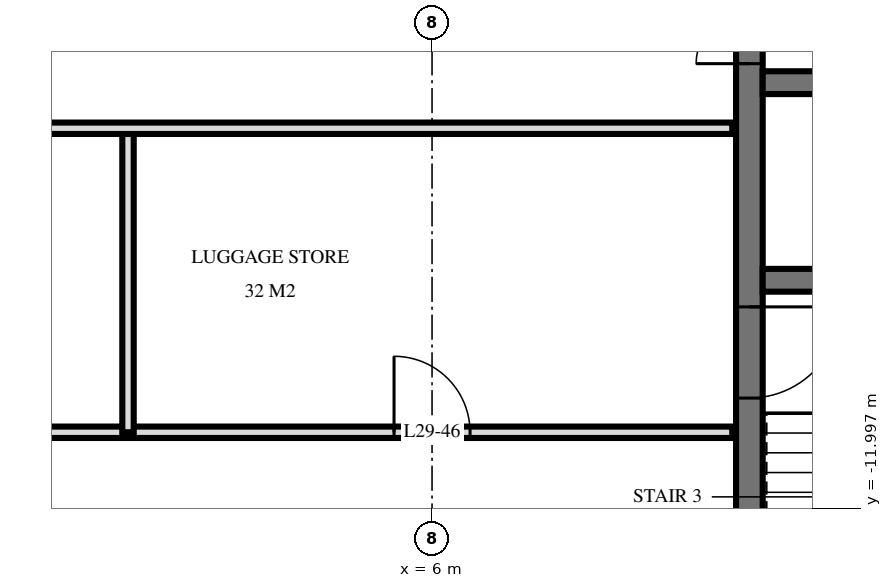
"""IFC4 building model, lengths in metres.
Left out: names, types, materials, properties, quantities, classifications, styles, units other than length and angle.
Written with IfcOpenShell. Run it as: python <this file> out.ifc"""

import sys

from ifc_helpers import new_model, si_unit, direction, frame, frame_2d, origin, place, context, subcontext, project, spatial, rectangle, extrude, element, fill, save


model = new_model("IFC4")
c1 = context("Model", 3, precision=1e-05, world=origin(), true_north=direction((0.0, 1.0)))
c2 = subcontext(c1, "Body", "Model", "MODEL_VIEW")
j1 = project(units=[si_unit("LENGTHUNIT", "METRE"), si_unit("PLANEANGLEUNIT", "RADIAN")], contexts=[c1])
p1 = place(None, origin())
s1 = spatial("IfcSite", under=j1, at=p1, CompositionType="ELEMENT")
p2 = place(p1, origin())
s2 = spatial("IfcBuilding", under=s1, at=p2, CompositionType="ELEMENT")
p3 = place(p2, frame((0.0, 0.0, 116.4)))
s3 = spatial("IfcBuildingStorey", under=s2, at=p3, CompositionType="ELEMENT", Elevation=116.4)
p4 = place(p3, frame((10.175, -14.55, 0.0), z_axis=(0.0, 0.0, 1.0), x_axis=(0.0, 1.0, 0.0)))
e1 = element("IfcWall", 1, at=p4, inside=s3, PredefinedType="SHEAR", context=c2, shape_type="SweptSolid", body=[
    extrude(rectangle(XDim=14.1, YDim=0.35, at=frame_2d((7.05, 0.0))), origin(), (0.0, 0.0, 1.0), 3.6),
])
p5 = place(p4, frame((8.4, 0.0, 0.0)))
e2 = element("IfcOpeningElement", 2, at=p5, cuts=e1, PredefinedType="OPENING", context=c2, shape_type="SweptSolid", body=[
    extrude(rectangle(XDim=1.4, YDim=2.4, at=frame_2d((0.7, 1.2))), frame((0.0, 0.185, 0.0), z_axis=(0.0, -1.0, 0.0), x_axis=(1.0, 0.0, 0.0)), (0.0, 0.0, 1.0), 0.37),
])
p6 = place(p4, frame((10.0, 0.0, 0.0)))
e3 = element("IfcOpeningElement", 3, at=p6, cuts=e1, PredefinedType="OPENING", context=c2, shape_type="SweptSolid", body=[
    extrude(rectangle(XDim=1.4, YDim=2.4, at=frame_2d((0.7, 1.2))), frame((0.0, 0.185, 0.0), z_axis=(0.0, -1.0, 0.0), x_axis=(1.0, 0.0, 0.0)), (0.0, 0.0, 1.0), 0.37),
])
p7 = place(p4, frame((4.0, 0.0, 0.0)))
e4 = element("IfcOpeningElement", 4, at=p7, cuts=e1, PredefinedType="OPENING", context=c2, shape_type="SweptSolid", body=[
    extrude(rectangle(XDim=1.2, YDim=2.1, at=frame_2d((0.6, 1.05))), frame((0.0, 0.185, 0.0), z_axis=(0.0, -1.0, 0.0), x_axis=(1.0, 0.0, 0.0)), (0.0, 0.0, 1.0), 0.37),
])
p8 = place(p3, frame((10.35, -6.4, 0.0), z_axis=(0.0, 0.0, 1.0), x_axis=(1.0, 0.0, 0.0)))
e5 = element("IfcWall", 5, at=p8, inside=s3, PredefinedType="SHEAR", context=c2, shape_type="SweptSolid", body=[
    extrude(rectangle(XDim=13.7, YDim=0.3, at=frame_2d((6.85, 0.0))), origin(), (0.0, 0.0, 1.0), 3.6),
])
p9 = place(p8, frame((12.05, 0.0, 0.0)))
e6 = element("IfcOpeningElement", 6, at=p9, cuts=e5, PredefinedType="OPENING", context=c2, shape_type="SweptSolid", body=[
    extrude(rectangle(XDim=1.1, YDim=2.1, at=frame_2d((0.55, 1.05))), frame((0.0, 0.16, 0.0), z_axis=(0.0, -1.0, 0.0), x_axis=(1.0, 0.0, 0.0)), (0.0, 0.0, 1.0), 0.32),
])
p10 = place(p8, frame((6.8, 0.0, 0.0)))
e7 = element("IfcOpeningElement", 7, at=p10, cuts=e5, PredefinedType="OPENING", context=c2, shape_type="SweptSolid", body=[
    extrude(rectangle(XDim=1.1, YDim=2.1, at=frame_2d((0.55, 1.05))), frame((0.0, 0.16, 0.0), z_axis=(0.0, -1.0, 0.0), x_axis=(1.0, 0.0, 0.0)), (0.0, 0.0, 1.0), 0.32),
])
p11 = place(p3, frame((10.35, -9.0, 0.0), z_axis=(0.0, 0.0, 1.0), x_axis=(1.0, 0.0, 0.0)))
e8 = element("IfcWall", 8, at=p11, inside=s3, PredefinedType="SHEAR", context=c2, shape_type="SweptSolid", body=[
    extrude(rectangle(XDim=13.7, YDim=0.3, at=frame_2d((6.85, 0.0))), origin(), (0.0, 0.0, 1.0), 3.6),
])
p12 = place(p11, frame((3.8, 0.0, 0.0)))
e9 = element("IfcOpeningElement", 9, at=p12, cuts=e8, PredefinedType="OPENING", context=c2, shape_type="SweptSolid", body=[
    extrude(rectangle(XDim=1.1, YDim=2.1, at=frame_2d((0.55, 1.05))), frame((0.0, 0.16, 0.0), z_axis=(0.0, -1.0, 0.0), x_axis=(1.0, 0.0, 0.0)), (0.0, 0.0, 1.0), 0.32),
])
p13 = place(p3, frame((2.0, -11.0, 0.0), z_axis=(0.0, 0.0, 1.0), x_axis=(0.0, 1.0, 0.0)))
e10 = element("IfcWall", 10, at=p13, inside=s3, PredefinedType="PARTITIONING", context=c2, shape_type="SweptSolid", body=[
    extrude(rectangle(XDim=4.0, YDim=0.15, at=frame_2d((2.0, 0.0))), origin(), (0.0, 0.0, 1.0), 3.32),
])
p14 = place(p3, frame((-9.95, -11.0, 0.0), z_axis=(0.0, 0.0, 1.0), x_axis=(1.0, 0.0, 0.0)))
e11 = element("IfcWall", 11, at=p14, inside=s3, PredefinedType="PARTITIONING", context=c2, shape_type="SweptSolid", body=[
    extrude(rectangle(XDim=19.9, YDim=0.15, at=frame_2d((9.95, 0.0))), origin(), (0.0, 0.0, 1.0), 3.32),
])
p15 = place(p14, frame((9.45, 0.0, 0.0)))
e12 = element("IfcOpeningElement", 12, at=p15, cuts=e11, PredefinedType="OPENING", context=c2, shape_type="SweptSolid", body=[
    extrude(rectangle(XDim=1.0, YDim=2.1, at=frame_2d((0.5, 1.05))), frame((0.0, 0.085, 0.0), z_axis=(0.0, -1.0, 0.0), x_axis=(1.0, 0.0, 0.0)), (0.0, 0.0, 1.0), 0.17),
])
p16 = place(p14, frame((15.45, 0.0, 0.0)))
e13 = element("IfcOpeningElement", 13, at=p16, cuts=e11, PredefinedType="OPENING", context=c2, shape_type="SweptSolid", body=[
    extrude(rectangle(XDim=1.0, YDim=2.1, at=frame_2d((0.5, 1.05))), frame((0.0, 0.085, 0.0), z_axis=(0.0, -1.0, 0.0), x_axis=(1.0, 0.0, 0.0)), (0.0, 0.0, 1.0), 0.17),
])
p17 = place(p3, frame((-9.95, -7.0, 0.0), z_axis=(0.0, 0.0, 1.0), x_axis=(1.0, 0.0, 0.0)))
e14 = element("IfcWall", 14, at=p17, inside=s3, PredefinedType="PARTITIONING", context=c2, shape_type="SweptSolid", body=[
    extrude(rectangle(XDim=19.9, YDim=0.15, at=frame_2d((9.95, 0.0))), origin(), (0.0, 0.0, 1.0), 3.32),
])
p18 = place(p17, frame((9.45, 0.0, 0.0)))
e15 = element("IfcOpeningElement", 15, at=p18, cuts=e14, PredefinedType="OPENING", context=c2, shape_type="SweptSolid", body=[
    extrude(rectangle(XDim=1.0, YDim=2.1, at=frame_2d((0.5, 1.05))), frame((0.0, 0.085, 0.0), z_axis=(0.0, -1.0, 0.0), x_axis=(1.0, 0.0, 0.0)), (0.0, 0.0, 1.0), 0.17),
])
p19 = place(p17, frame((3.45, 0.0, 0.0)))
e16 = element("IfcOpeningElement", 16, at=p19, cuts=e14, PredefinedType="OPENING", context=c2, shape_type="SweptSolid", body=[
    extrude(rectangle(XDim=1.0, YDim=2.1, at=frame_2d((0.5, 1.05))), frame((0.0, 0.085, 0.0), z_axis=(0.0, -1.0, 0.0), x_axis=(1.0, 0.0, 0.0)), (0.0, 0.0, 1.0), 0.17),
])
p20 = place(p5, origin())
e17 = element("IfcDoor", 17, at=p20, inside=s3, OperationType="DOUBLE_DOOR_SINGLE_SWING", PredefinedType="DOOR", context=c2, shape_type="SweptSolid", body=[
    extrude(rectangle(XDim=1.4, YDim=2.4, at=frame_2d((0.7, 1.2))), frame((0.0, 0.025, 0.0), z_axis=(0.0, -1.0, 0.0), x_axis=(1.0, 0.0, 0.0)), (0.0, 0.0, 1.0), 0.05),
])
fill(e2, e17)
p21 = place(p7, frame((0.6, 0.0, 0.0), z_axis=(0.0, 0.0, 1.0), x_axis=(-1.0, 0.0, 0.0)))
e18 = element("IfcDoor", 18, at=p21, inside=s3, OperationType="SINGLE_SWING_RIGHT", PredefinedType="DOOR", context=c2, shape_type="SweptSolid", body=[
    extrude(rectangle(XDim=1.2, YDim=2.1, at=frame_2d((0.0, 1.05))), frame((0.0, -0.025, 0.0), z_axis=(0.0, 1.0, 0.0), x_axis=(-1.0, 0.0, 0.0)), (0.0, 0.0, 1.0), 0.05),
])
fill(e4, e18)
p22 = place(p16, origin())
e19 = element("IfcDoor", 19, at=p22, inside=s3, OperationType="SINGLE_SWING_RIGHT", PredefinedType="DOOR", context=c2, shape_type="SweptSolid", body=[
    extrude(rectangle(XDim=1.0, YDim=2.1, at=frame_2d((0.5, 1.05))), frame((0.0, 0.025, 0.0), z_axis=(0.0, -1.0, 0.0), x_axis=(1.0, 0.0, 0.0)), (0.0, 0.0, 1.0), 0.05),
])
fill(e13, e19)
save(model, sys.argv[1])
